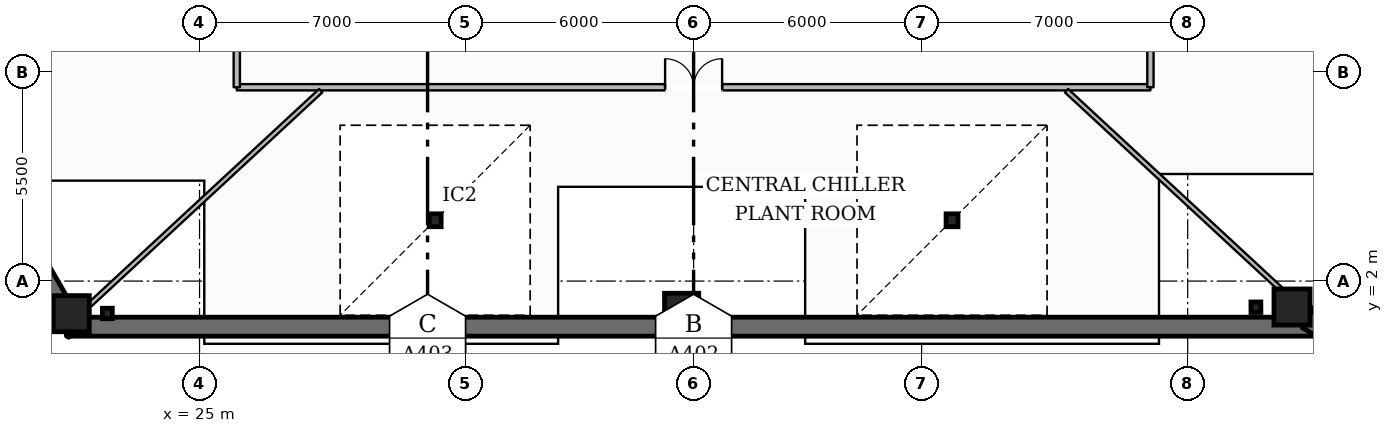
"""IFC4 building model, lengths in metres.
Left out: names, types, materials, properties, quantities, classifications, styles, units other than length and angle.
Written with IfcOpenShell. Run it as: python <this file> out.ifc"""

import sys

from ifc_helpers import new_model, si_unit, direction, frame, frame_2d, origin, origin_2d, place, context, subcontext, project, spatial, rectangle, hollow_rectangle, i_section, extrude, element, fill, save


model = new_model("IFC4")
c1 = context("Model", 3, precision=1e-05, world=origin(), true_north=direction((0.0, 1.0)))
c2 = subcontext(c1, "Body", "Model", "MODEL_VIEW")
j1 = project(units=[si_unit("LENGTHUNIT", "METRE"), si_unit("PLANEANGLEUNIT", "RADIAN")], contexts=[c1])
p1 = place(None, origin())
s1 = spatial("IfcSite", under=j1, at=p1, CompositionType="ELEMENT")
p2 = place(p1, origin())
s2 = spatial("IfcBuilding", under=s1, at=p2, CompositionType="ELEMENT")
p3 = place(p2, frame((0.0, 0.0, -8.4)))
s3 = spatial("IfcBuildingStorey", under=s2, at=p3, CompositionType="ELEMENT", Elevation=-8.4)
p4 = place(p3, frame((13.122, 15.618, 0.0), z_axis=(0.0, 0.0, 1.0), x_axis=(0.499998305863, -0.866026381893, 0.0)))
e1 = element("IfcWall", 1, at=p4, inside=s3, PredefinedType="SHEAR", context=c2, shape_type="SweptSolid", body=[
    extrude(rectangle(XDim=17.289, YDim=0.5, at=frame_2d((8.644, 0.0))), origin(), (0.0, 0.0, 1.0), 3.95),
])
p5 = place(p3, frame((21.5, 0.8, 0.0), z_axis=(0.0, 0.0, 1.0), x_axis=(1.0, 0.0, 0.0)))
e2 = element("IfcWall", 2, at=p5, inside=s3, PredefinedType="SHEAR", context=c2, shape_type="SweptSolid", body=[
    extrude(rectangle(XDim=33.0, YDim=0.5, at=frame_2d((16.5, 0.0))), origin(), (0.0, 0.0, 1.0), 3.95),
])
p6 = place(p3, frame((54.233, 0.646, 0.0), z_axis=(0.0, 0.0, 1.0), x_axis=(0.499998305863, 0.866026381893, 0.0)))
e3 = element("IfcWall", 3, at=p6, inside=s3, PredefinedType="SHEAR", context=c2, shape_type="SweptSolid", body=[
    extrude(rectangle(XDim=17.289, YDim=0.5, at=frame_2d((8.644, 0.0))), origin(), (0.0, 0.0, 1.0), 3.95),
])
for number, where, z_axis, x_axis in (
    (4, (21.625, 1.142, 0.0), (0.0, 0.0, 1.0), (1.0, 0.0, 0.0)),
    (5, (53.746, 1.318, 0.0), (0.0, 0.0, 1.0), (1.0, 0.0, 0.0)),
):
    element("IfcColumn", number, at=place(p3, frame(where, z_axis=z_axis, x_axis=x_axis)), inside=s3, PredefinedType="COLUMN", context=c2, shape_type="SweptSolid", body=[
        extrude(hollow_rectangle(XDim=0.95, YDim=0.95, WallThickness=0.04, at=origin_2d()), origin(), (0.0, 0.0, 1.0), 3.95),
    ])
p7 = place(p3, frame((37.685, 1.23, 0.0), z_axis=(0.0, 0.0, 1.0), x_axis=(1.0, 0.0, 0.0)))
e6 = element("IfcColumn", 6, at=p7, inside=s3, PredefinedType="COLUMN", context=c2, shape_type="SweptSolid", body=[
    extrude(hollow_rectangle(XDim=0.9, YDim=0.9, WallThickness=0.038, at=origin_2d()), origin(), (0.0, 0.0, 1.0), 3.95),
])
for number, where, z_axis, x_axis in (
    (7, (22.574, 1.148, 0.0), (0.0, 0.0, 1.0), (1.0, 0.005, 0.0)),
    (8, (52.795, 1.312, 0.0), (0.0, 0.0, 1.0), (1.0, 0.005, 0.0)),
):
    element("IfcColumn", number, at=place(p3, frame(where, z_axis=z_axis, x_axis=x_axis)), inside=s3, PredefinedType="PILASTER", context=c2, shape_type="SweptSolid", body=[
        extrude(i_section(OverallWidth=0.261, OverallDepth=0.276, WebThickness=0.015, FlangeThickness=0.025, at=origin_2d()), origin(), (0.0, 0.0, 1.0), 3.95),
    ])
for number, where, z_axis, x_axis in (
    (9, (31.2, 3.6, 0.0), (0.0, 0.0, 1.0), (1.0, 0.0, 0.0)),
    (10, (44.8, 3.6, 0.0), (0.0, 0.0, 1.0), (1.0, 0.0, 0.0)),
):
    element("IfcColumn", number, at=place(p3, frame(where, z_axis=z_axis, x_axis=x_axis)), inside=s3, PredefinedType="COLUMN", context=c2, shape_type="SweptSolid", body=[
        extrude(i_section(OverallWidth=0.314, OverallDepth=0.34, WebThickness=0.019, FlangeThickness=0.031, at=origin_2d()), origin(), (0.0, 0.0, 1.0), 3.95),
    ])
p8 = place(p3, frame((25.98, 7.1, 0.0), z_axis=(0.0, 0.0, 1.0), x_axis=(1.0, 0.0, 0.0)))
e11 = element("IfcWall", 11, at=p8, inside=s3, PredefinedType="PARTITIONING", context=c2, shape_type="SweptSolid", body=[
    extrude(rectangle(XDim=24.04, YDim=0.165, at=frame_2d((12.02, 0.0))), origin(), (0.0, 0.0, 1.0), 3.95),
])
p9 = place(p8, frame((11.27, 0.0, 0.0)))
e12 = element("IfcOpeningElement", 12, at=p9, cuts=e11, PredefinedType="OPENING", context=c2, shape_type="SweptSolid", body=[
    extrude(rectangle(XDim=1.5, YDim=2.25, at=frame_2d((0.75, 1.125))), frame((0.0, 0.093, 0.0), z_axis=(0.0, -1.0, 0.0), x_axis=(1.0, 0.0, 0.0)), (0.0, 0.0, 1.0), 0.185),
])
p10 = place(p3, frame((25.98, 7.1, 0.0), z_axis=(0.0, 0.0, 1.0), x_axis=(0.0, 1.0, 0.0)))
e13 = element("IfcWall", 13, at=p10, inside=s3, PredefinedType="PARTITIONING", context=c2, shape_type="SweptSolid", body=[
    extrude(rectangle(XDim=18.0, YDim=0.165, at=frame_2d((9.0, 0.0))), origin(), (0.0, 0.0, 1.0), 3.95),
])
p11 = place(p10, frame((8.25, 0.0, 0.0)))
e14 = element("IfcOpeningElement", 14, at=p11, cuts=e13, PredefinedType="OPENING", context=c2, shape_type="SweptSolid", body=[
    extrude(rectangle(XDim=1.5, YDim=2.25, at=frame_2d((0.75, 1.125))), frame((0.0, 0.093, 0.0), z_axis=(0.0, -1.0, 0.0), x_axis=(1.0, 0.0, 0.0)), (0.0, 0.0, 1.0), 0.185),
])
p12 = place(p3, frame((50.02, 7.1, 0.0), z_axis=(0.0, 0.0, 1.0), x_axis=(0.0, 1.0, 0.0)))
e15 = element("IfcWall", 15, at=p12, inside=s3, PredefinedType="PARTITIONING", context=c2, shape_type="SweptSolid", body=[
    extrude(rectangle(XDim=18.0, YDim=0.165, at=frame_2d((9.0, 0.0))), origin(), (0.0, 0.0, 1.0), 3.638),
])
p13 = place(p12, frame((8.25, 0.0, 0.0)))
e16 = element("IfcOpeningElement", 16, at=p13, cuts=e15, PredefinedType="OPENING", context=c2, shape_type="SweptSolid", body=[
    extrude(rectangle(XDim=1.5, YDim=2.25, at=frame_2d((0.75, 1.125))), frame((0.0, 0.093, 0.0), z_axis=(0.0, -1.0, 0.0), x_axis=(1.0, 0.0, 0.0)), (0.0, 0.0, 1.0), 0.185),
])
p14 = place(p3, frame((28.189, 7.01, 0.0), z_axis=(0.0, 0.0, 1.0), x_axis=(-0.733538790589, -0.679647587137, 0.0)))
e17 = element("IfcWall", 17, at=p14, inside=s3, PredefinedType="PARTITIONING", context=c2, shape_type="SweptSolid", body=[
    extrude(rectangle(XDim=8.29, YDim=0.125, at=frame_2d((4.145, 0.0))), origin(), (0.0, 0.0, 1.0), 3.95),
])
p15 = place(p3, frame((47.811, 7.01, 0.0), z_axis=(0.0, 0.0, 1.0), x_axis=(0.733527128647, -0.679660173571, 0.0)))
e18 = element("IfcWall", 18, at=p15, inside=s3, PredefinedType="PARTITIONING", context=c2, shape_type="SweptSolid", body=[
    extrude(rectangle(XDim=7.664, YDim=0.125, at=frame_2d((3.832, 0.0))), origin(), (0.0, 0.0, 1.0), 3.417),
])
p16 = place(p9, origin())
e19 = element("IfcDoor", 19, at=p16, inside=s3, OperationType="DOUBLE_DOOR_SINGLE_SWING", PredefinedType="DOOR", context=c2, shape_type="SweptSolid", body=[
    extrude(rectangle(XDim=1.5, YDim=2.25, at=frame_2d((0.75, 1.125))), frame((0.0, 0.025, 0.0), z_axis=(0.0, -1.0, 0.0), x_axis=(1.0, 0.0, 0.0)), (0.0, 0.0, 1.0), 0.05),
])
fill(e12, e19)
save(model, sys.argv[1])
